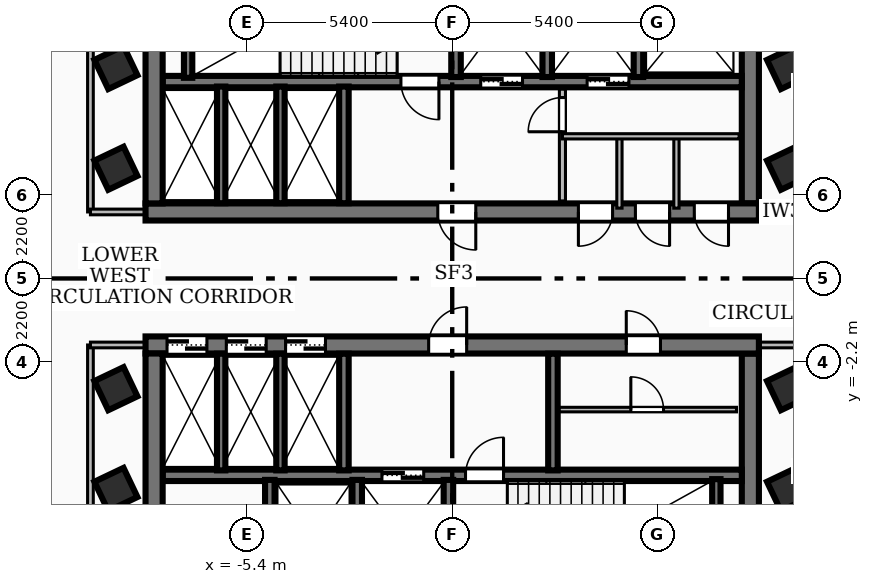
"""IFC4 building model, lengths in metres.
Left out: names, types, materials, properties, quantities, classifications, styles, units other than length and angle.
Written with IfcOpenShell. Run it as: python <this file> out.ifc"""

import sys

from ifc_helpers import new_model, si_unit, direction, frame, frame_2d, origin, origin_2d, place, context, subcontext, project, spatial, rectangle, extrude, element, fill, save


model = new_model("IFC4")
c1 = context("Model", 3, precision=1e-05, world=origin(), true_north=direction((0.0, 1.0)))
c2 = subcontext(c1, "Body", "Model", "MODEL_VIEW")
j1 = project(units=[si_unit("LENGTHUNIT", "METRE"), si_unit("PLANEANGLEUNIT", "RADIAN")], contexts=[c1])
p1 = place(None, origin())
s1 = spatial("IfcSite", under=j1, at=p1, CompositionType="ELEMENT")
p2 = place(p1, origin())
s2 = spatial("IfcBuilding", under=s1, at=p2, CompositionType="ELEMENT")
p3 = place(p2, frame((0.0, 0.0, 188.28)))
s3 = spatial("IfcBuildingStorey", under=s2, at=p3, CompositionType="ELEMENT", Elevation=188.28)
p4 = place(p3, frame((8.07, 1.75, 0.0), z_axis=(0.0, 0.0, 1.0), x_axis=(-1.0, 0.0, 0.0)))
e1 = element("IfcWall", 1, at=p4, inside=s3, PredefinedType="SHEAR", context=c2, shape_type="SweptSolid", body=[
    extrude(rectangle(XDim=16.14, YDim=0.45, at=frame_2d((8.07, 0.0))), origin(), (0.0, 0.0, 1.0), 4.06),
])
p5 = place(p4, frame((7.45, 0.0, 0.0)))
e2 = element("IfcOpeningElement", 2, at=p5, cuts=e1, PredefinedType="OPENING", context=c2, shape_type="SweptSolid", body=[
    extrude(rectangle(XDim=1.0, YDim=2.1, at=frame_2d((0.5, 1.05))), frame((0.0, 0.235, 0.0), z_axis=(0.0, -1.0, 0.0), x_axis=(1.0, 0.0, 0.0)), (0.0, 0.0, 1.0), 0.47),
])
p6 = place(p4, frame((3.85, 0.0, 0.0)))
e3 = element("IfcOpeningElement", 3, at=p6, cuts=e1, PredefinedType="OPENING", context=c2, shape_type="SweptSolid", body=[
    extrude(rectangle(XDim=0.9, YDim=2.06, at=frame_2d((0.45, 1.03))), frame((0.0, 0.235, 0.0), z_axis=(0.0, -1.0, 0.0), x_axis=(1.0, 0.0, 0.0)), (0.0, 0.0, 1.0), 0.47),
])
p7 = place(p4, frame((2.35, 0.0, 0.0)))
e4 = element("IfcOpeningElement", 4, at=p7, cuts=e1, PredefinedType="OPENING", context=c2, shape_type="SweptSolid", body=[
    extrude(rectangle(XDim=0.9, YDim=2.06, at=frame_2d((0.45, 1.03))), frame((0.0, 0.235, 0.0), z_axis=(0.0, -1.0, 0.0), x_axis=(1.0, 0.0, 0.0)), (0.0, 0.0, 1.0), 0.47),
])
p8 = place(p4, frame((0.8, 0.0, 0.0)))
e5 = element("IfcOpeningElement", 5, at=p8, cuts=e1, PredefinedType="OPENING", context=c2, shape_type="SweptSolid", body=[
    extrude(rectangle(XDim=0.9, YDim=2.06, at=frame_2d((0.45, 1.03))), frame((0.0, 0.235, 0.0), z_axis=(0.0, -1.0, 0.0), x_axis=(1.0, 0.0, 0.0)), (0.0, 0.0, 1.0), 0.47),
])
for number, where, z_axis, x_axis in (
    (6, (-7.845, 1.975, 0.0), (0.0, 0.0, 1.0), (0.0, 1.0, 0.0)),
    (7, (7.845, 8.31, 0.0), (0.0, 0.0, 1.0), (0.0, -1.0, 0.0)),
):
    element("IfcWall", number, at=place(p3, frame(where, z_axis=z_axis, x_axis=x_axis)), inside=s3, PredefinedType="SHEAR", context=c2, shape_type="SweptSolid", body=[
        extrude(rectangle(XDim=6.335, YDim=0.45, at=frame_2d((3.167, 0.0))), origin(), (0.0, 0.0, 1.0), 4.06),
    ])
p9 = place(p3, frame((7.62, 5.18, 0.0), z_axis=(0.0, 0.0, 1.0), x_axis=(-1.0, 0.0, 0.0)))
e8 = element("IfcWall", 8, at=p9, inside=s3, PredefinedType="SOLIDWALL", context=c2, shape_type="SweptSolid", body=[
    extrude(rectangle(XDim=15.24, YDim=0.3, at=frame_2d((7.62, 0.0))), origin(), (0.0, 0.0, 1.0), 4.06),
])
p10 = place(p9, frame((5.77, 0.0, 0.0)))
e9 = element("IfcOpeningElement", 9, at=p10, cuts=e8, PredefinedType="OPENING", context=c2, shape_type="SweptSolid", body=[
    extrude(rectangle(XDim=1.1, YDim=2.15, at=frame_2d((0.55, 1.075))), frame((0.0, 0.16, 0.0), z_axis=(0.0, -1.0, 0.0), x_axis=(1.0, 0.0, 0.0)), (0.0, 0.0, 1.0), 0.32),
])
p11 = place(p9, frame((2.97, 0.0, 0.0)))
e10 = element("IfcOpeningElement", 10, at=p11, cuts=e8, PredefinedType="OPENING", context=c2, shape_type="SweptSolid", body=[
    extrude(rectangle(XDim=1.1, YDim=2.15, at=frame_2d((0.55, 1.075))), frame((0.0, 0.16, 0.0), z_axis=(0.0, -1.0, 0.0), x_axis=(1.0, 0.0, 0.0)), (0.0, 0.0, 1.0), 0.32),
])
p12 = place(p9, frame((7.97, 0.0, 0.0)))
e11 = element("IfcOpeningElement", 11, at=p12, cuts=e8, PredefinedType="OPENING", context=c2, shape_type="SweptSolid", body=[
    extrude(rectangle(XDim=1.0, YDim=2.1, at=frame_2d((0.5, 1.05))), frame((0.0, 0.16, 0.0), z_axis=(0.0, -1.0, 0.0), x_axis=(1.0, 0.0, 0.0)), (0.0, 0.0, 1.0), 0.32),
])
p13 = place(p3, frame((-8.07, -1.75, 0.0), z_axis=(0.0, 0.0, 1.0), x_axis=(1.0, 0.0, 0.0)))
e12 = element("IfcWall", 12, at=p13, inside=s3, PredefinedType="SHEAR", context=c2, shape_type="SweptSolid", body=[
    extrude(rectangle(XDim=16.14, YDim=0.45, at=frame_2d((8.07, 0.0))), origin(), (0.0, 0.0, 1.0), 4.06),
])
p14 = place(p13, frame((7.45, 0.0, 0.0)))
e13 = element("IfcOpeningElement", 13, at=p14, cuts=e12, PredefinedType="OPENING", context=c2, shape_type="SweptSolid", body=[
    extrude(rectangle(XDim=1.0, YDim=2.1, at=frame_2d((0.5, 1.05))), frame((0.0, 0.235, 0.0), z_axis=(0.0, -1.0, 0.0), x_axis=(1.0, 0.0, 0.0)), (0.0, 0.0, 1.0), 0.47),
])
p15 = place(p13, frame((12.65, 0.0, 0.0)))
e14 = element("IfcOpeningElement", 14, at=p15, cuts=e12, PredefinedType="OPENING", context=c2, shape_type="SweptSolid", body=[
    extrude(rectangle(XDim=0.9, YDim=2.06, at=frame_2d((0.45, 1.03))), frame((0.0, 0.235, 0.0), z_axis=(0.0, -1.0, 0.0), x_axis=(1.0, 0.0, 0.0)), (0.0, 0.0, 1.0), 0.47),
])
p16 = place(p13, frame((0.565, 0.0, 0.0)))
e15 = element("IfcOpeningElement", 15, at=p16, cuts=e12, PredefinedType="OPENING", context=c2, shape_type="SweptSolid", body=[
    extrude(rectangle(XDim=1.05, YDim=2.15, at=frame_2d((0.525, 1.075))), frame((0.0, 0.235, 0.0), z_axis=(0.0, -1.0, 0.0), x_axis=(1.0, 0.0, 0.0)), (0.0, 0.0, 1.0), 0.47),
])
p17 = place(p13, frame((2.125, 0.0, 0.0)))
e16 = element("IfcOpeningElement", 16, at=p17, cuts=e12, PredefinedType="OPENING", context=c2, shape_type="SweptSolid", body=[
    extrude(rectangle(XDim=1.05, YDim=2.15, at=frame_2d((0.525, 1.075))), frame((0.0, 0.235, 0.0), z_axis=(0.0, -1.0, 0.0), x_axis=(1.0, 0.0, 0.0)), (0.0, 0.0, 1.0), 0.47),
])
p18 = place(p13, frame((3.685, 0.0, 0.0)))
e17 = element("IfcOpeningElement", 17, at=p18, cuts=e12, PredefinedType="OPENING", context=c2, shape_type="SweptSolid", body=[
    extrude(rectangle(XDim=1.05, YDim=2.15, at=frame_2d((0.525, 1.075))), frame((0.0, 0.235, 0.0), z_axis=(0.0, -1.0, 0.0), x_axis=(1.0, 0.0, 0.0)), (0.0, 0.0, 1.0), 0.47),
])
for number, where, z_axis, x_axis in (
    (18, (-7.845, -8.31, 0.0), (0.0, 0.0, 1.0), (0.0, 1.0, 0.0)),
    (19, (7.845, -1.975, 0.0), (0.0, 0.0, 1.0), (0.0, -1.0, 0.0)),
):
    element("IfcWall", number, at=place(p3, frame(where, z_axis=z_axis, x_axis=x_axis)), inside=s3, PredefinedType="SHEAR", context=c2, shape_type="SweptSolid", body=[
        extrude(rectangle(XDim=6.335, YDim=0.45, at=frame_2d((3.167, 0.0))), origin(), (0.0, 0.0, 1.0), 4.06),
    ])
p19 = place(p3, frame((-7.62, -5.18, 0.0), z_axis=(0.0, 0.0, 1.0), x_axis=(1.0, 0.0, 0.0)))
e20 = element("IfcWall", 20, at=p19, inside=s3, PredefinedType="SOLIDWALL", context=c2, shape_type="SweptSolid", body=[
    extrude(rectangle(XDim=15.24, YDim=0.3, at=frame_2d((7.62, 0.0))), origin(), (0.0, 0.0, 1.0), 4.06),
])
p20 = place(p19, frame((5.77, 0.0, 0.0)))
e21 = element("IfcOpeningElement", 21, at=p20, cuts=e20, PredefinedType="OPENING", context=c2, shape_type="SweptSolid", body=[
    extrude(rectangle(XDim=1.1, YDim=2.15, at=frame_2d((0.55, 1.075))), frame((0.0, 0.16, 0.0), z_axis=(0.0, -1.0, 0.0), x_axis=(1.0, 0.0, 0.0)), (0.0, 0.0, 1.0), 0.32),
])
p21 = place(p19, frame((7.97, 0.0, 0.0)))
e22 = element("IfcOpeningElement", 22, at=p21, cuts=e20, PredefinedType="OPENING", context=c2, shape_type="SweptSolid", body=[
    extrude(rectangle(XDim=1.0, YDim=2.1, at=frame_2d((0.5, 1.05))), frame((0.0, 0.16, 0.0), z_axis=(0.0, -1.0, 0.0), x_axis=(1.0, 0.0, 0.0)), (0.0, 0.0, 1.0), 0.32),
])
for number, where, z_axis, x_axis in (
    (23, (-6.95, 5.28, 0.0), (0.0, 0.0, 1.0), (0.0, 1.0, 0.0)),
    (24, (6.95, -8.34, 0.0), (0.0, 0.0, 1.0), (0.0, 1.0, 0.0)),
):
    element("IfcWall", number, at=place(p3, frame(where, z_axis=z_axis, x_axis=x_axis)), inside=s3, PredefinedType="SOLIDWALL", context=c2, shape_type="SweptSolid", body=[
        extrude(rectangle(XDim=3.06, YDim=0.22, at=frame_2d((1.53, 0.0))), origin(), (0.0, 0.0, 1.0), 4.06),
    ])
for number, where, z_axis, x_axis in (
    (25, (0.1, 5.3, 0.0), (0.0, 0.0, 1.0), (0.0, 1.0, 0.0)),
    (26, (2.5, 5.3, 0.0), (0.0, 0.0, 1.0), (0.0, 1.0, 0.0)),
    (27, (4.9, 5.3, 0.0), (0.0, 0.0, 1.0), (0.0, 1.0, 0.0)),
):
    element("IfcWall", number, at=place(p3, frame(where, z_axis=z_axis, x_axis=x_axis)), inside=s3, PredefinedType="SOLIDWALL", context=c2, shape_type="SweptSolid", body=[
        extrude(rectangle(XDim=3.04, YDim=0.25, at=frame_2d((1.52, 0.0))), origin(), (0.0, 0.0, 1.0), 4.06),
    ])
p22 = place(p3, frame((-2.85, 1.98, 0.0), z_axis=(0.0, 0.0, 1.0), x_axis=(0.0, 1.0, 0.0)))
e28 = element("IfcWall", 28, at=p22, inside=s3, PredefinedType="SOLIDWALL", context=c2, shape_type="SweptSolid", body=[
    extrude(rectangle(XDim=3.07, YDim=0.25, at=frame_2d((1.535, 0.0))), origin(), (0.0, 0.0, 1.0), 4.06),
])
for number, where, z_axis, x_axis in (
    (29, (-0.1, -8.34, 0.0), (0.0, 0.0, 1.0), (0.0, 1.0, 0.0)),
    (30, (-2.5, -8.34, 0.0), (0.0, 0.0, 1.0), (0.0, 1.0, 0.0)),
    (31, (-4.8, -8.34, 0.0), (0.0, 0.0, 1.0), (0.0, 1.0, 0.0)),
):
    element("IfcWall", number, at=place(p3, frame(where, z_axis=z_axis, x_axis=x_axis)), inside=s3, PredefinedType="SOLIDWALL", context=c2, shape_type="SweptSolid", body=[
        extrude(rectangle(XDim=3.04, YDim=0.25, at=frame_2d((1.52, 0.0))), origin(), (0.0, 0.0, 1.0), 4.06),
    ])
for number, where, z_axis, x_axis in (
    (32, (-2.85, -5.05, 0.0), (0.0, 0.0, 1.0), (0.0, 1.0, 0.0)),
    (33, (2.65, -5.05, 0.0), (0.0, 0.0, 1.0), (0.0, 1.0, 0.0)),
):
    element("IfcWall", number, at=place(p3, frame(where, z_axis=z_axis, x_axis=x_axis)), inside=s3, PredefinedType="SOLIDWALL", context=c2, shape_type="SweptSolid", body=[
        extrude(rectangle(XDim=3.07, YDim=0.25, at=frame_2d((1.535, 0.0))), origin(), (0.0, 0.0, 1.0), 4.06),
    ])
for number, where, z_axis, x_axis in (
    (34, (-6.08, 1.98, 0.0), (0.0, 0.0, 1.0), (0.0, 1.0, 0.0)),
    (35, (-4.52, 1.98, 0.0), (0.0, 0.0, 1.0), (0.0, 1.0, 0.0)),
    (36, (-6.08, -5.05, 0.0), (0.0, 0.0, 1.0), (0.0, 1.0, 0.0)),
    (37, (-4.52, -5.05, 0.0), (0.0, 0.0, 1.0), (0.0, 1.0, 0.0)),
):
    element("IfcWall", number, at=place(p3, frame(where, z_axis=z_axis, x_axis=x_axis)), inside=s3, PredefinedType="SOLIDWALL", context=c2, shape_type="SweptSolid", body=[
        extrude(rectangle(XDim=3.07, YDim=0.22, at=frame_2d((1.535, 0.0))), origin(), (0.0, 0.0, 1.0), 4.06),
    ])
for number, where, z_axis, x_axis in (
    (38, (-8.85, -5.55, 0.0), (0.0, 0.0, 1.0), (0.903, 0.43, 0.0)),
    (39, (-8.85, -2.9, 0.0), (0.0, 0.0, 1.0), (0.903, 0.43, 0.0)),
    (40, (-8.85, 2.9, 0.0), (0.0, 0.0, 1.0), (0.903, 0.43, 0.0)),
    (41, (-8.85, 5.55, 0.0), (0.0, 0.0, 1.0), (0.903, 0.43, 0.0)),
    (42, (8.85, -5.55, 0.0), (0.0, 0.0, 1.0), (0.903, 0.43, 0.0)),
    (43, (8.85, -2.9, 0.0), (0.0, 0.0, 1.0), (0.903, 0.43, 0.0)),
    (44, (8.85, 2.9, 0.0), (0.0, 0.0, 1.0), (0.903, 0.43, 0.0)),
    (45, (8.85, 5.55, 0.0), (0.0, 0.0, 1.0), (0.903, 0.43, 0.0)),
):
    element("IfcColumn", number, at=place(p3, frame(where, z_axis=z_axis, x_axis=x_axis)), inside=s3, PredefinedType="COLUMN", context=c2, shape_type="SweptSolid", body=[
        extrude(rectangle(XDim=0.85, YDim=0.85, at=origin_2d()), origin(), (0.0, 0.0, 1.0), 4.32),
    ])
p23 = place(p3, frame((2.9, 2.04, 0.0), z_axis=(0.0, 0.0, 1.0), x_axis=(0.0, 1.0, 0.0)))
e46 = element("IfcWall", 46, at=p23, inside=s3, PredefinedType="PARTITIONING", context=c2, shape_type="SweptSolid", body=[
    extrude(rectangle(XDim=2.94, YDim=0.16, at=frame_2d((1.47, 0.0))), origin(), (0.0, 0.0, 1.0), 3.29),
])
p24 = place(p23, frame((1.82, 0.0, 0.0)))
e47 = element("IfcOpeningElement", 47, at=p24, cuts=e46, PredefinedType="OPENING", context=c2, shape_type="SweptSolid", body=[
    extrude(rectangle(XDim=0.9, YDim=2.06, at=frame_2d((0.45, 1.03))), frame((0.0, 0.09, 0.0), z_axis=(0.0, -1.0, 0.0), x_axis=(1.0, 0.0, 0.0)), (0.0, 0.0, 1.0), 0.18),
])
p25 = place(p3, frame((2.9, 3.74, 0.0), z_axis=(0.0, 0.0, 1.0), x_axis=(1.0, 0.0, 0.0)))
e48 = element("IfcWall", 48, at=p25, inside=s3, PredefinedType="PARTITIONING", context=c2, shape_type="SweptSolid", body=[
    extrude(rectangle(XDim=4.65, YDim=0.138, at=frame_2d((2.325, 0.0))), origin(), (0.0, 0.0, 1.0), 4.06),
])
p26 = place(p3, frame((2.8, -3.45, 0.0), z_axis=(0.0, 0.0, 1.0), x_axis=(1.0, 0.0, 0.0)))
e49 = element("IfcWall", 49, at=p26, inside=s3, PredefinedType="PARTITIONING", context=c2, shape_type="SweptSolid", body=[
    extrude(rectangle(XDim=4.68, YDim=0.12, at=frame_2d((2.34, 0.0))), origin(), (0.0, 0.0, 1.0), 4.06),
])
p27 = place(p26, frame((1.9, 0.0, 0.0)))
e50 = element("IfcOpeningElement", 50, at=p27, cuts=e49, PredefinedType="OPENING", context=c2, shape_type="SweptSolid", body=[
    extrude(rectangle(XDim=0.86, YDim=2.04, at=frame_2d((0.43, 1.02))), frame((0.0, 0.07, 0.0), z_axis=(0.0, -1.0, 0.0), x_axis=(1.0, 0.0, 0.0)), (0.0, 0.0, 1.0), 0.14),
])
for number, where, z_axis, x_axis in (
    (51, (4.4, 1.85, 0.0), (0.0, 0.0, 1.0), (0.0, 1.0, 0.0)),
    (52, (5.9, 1.85, 0.0), (0.0, 0.0, 1.0), (0.0, 1.0, 0.0)),
):
    element("IfcWall", number, at=place(p3, frame(where, z_axis=z_axis, x_axis=x_axis)), inside=s3, PredefinedType="PARTITIONING", context=c2, shape_type="SweptSolid", body=[
        extrude(rectangle(XDim=1.89, YDim=0.138, at=frame_2d((0.945, 0.0))), origin(), (0.0, 0.0, 1.0), 3.29),
    ])
p28 = place(p3, frame((-9.52, 1.75, 0.0), z_axis=(0.0, 0.0, 1.0), x_axis=(0.0, 1.0, 0.0)))
e53 = element("IfcWall", 53, at=p28, inside=s3, PredefinedType="PARTITIONING", context=c2, shape_type="SweptSolid", body=[
    extrude(rectangle(XDim=6.63, YDim=0.15, at=frame_2d((3.315, 0.0))), origin(), (0.0, 0.0, 1.0), 4.06),
])
p29 = place(p3, frame((-7.85, 1.75, 0.0), z_axis=(0.0, 0.0, 1.0), x_axis=(-1.0, 0.0, 0.0)))
e54 = element("IfcWall", 54, at=p29, inside=s3, PredefinedType="PARTITIONING", context=c2, shape_type="SweptSolid", body=[
    extrude(rectangle(XDim=1.67, YDim=0.15, at=frame_2d((0.835, 0.0))), origin(), (0.0, 0.0, 1.0), 3.29),
])
p30 = place(p3, frame((-9.52, -8.38, 0.0), z_axis=(0.0, 0.0, 1.0), x_axis=(0.0, 1.0, 0.0)))
e55 = element("IfcWall", 55, at=p30, inside=s3, PredefinedType="PARTITIONING", context=c2, shape_type="SweptSolid", body=[
    extrude(rectangle(XDim=6.63, YDim=0.15, at=frame_2d((3.315, 0.0))), origin(), (0.0, 0.0, 1.0), 3.364),
])
for number, where, z_axis, x_axis in (
    (56, (-7.85, -1.75, 0.0), (0.0, 0.0, 1.0), (-1.0, 0.0, 0.0)),
    (57, (7.85, 1.75, 0.0), (0.0, 0.0, 1.0), (1.0, 0.0, 0.0)),
    (58, (7.85, -1.75, 0.0), (0.0, 0.0, 1.0), (1.0, 0.0, 0.0)),
):
    element("IfcWall", number, at=place(p3, frame(where, z_axis=z_axis, x_axis=x_axis)), inside=s3, PredefinedType="PARTITIONING", context=c2, shape_type="SweptSolid", body=[
        extrude(rectangle(XDim=1.67, YDim=0.15, at=frame_2d((0.835, 0.0))), origin(), (0.0, 0.0, 1.0), 3.29),
    ])
p31 = place(p3, frame((8.362, 15.677, 0.0), z_axis=(0.0, 0.0, 1.0), x_axis=(0.429924831179, -0.902864685064, 0.0)))
e59 = element("IfcWall", 59, at=p31, inside=s3, PredefinedType="PARTITIONING", context=c2, shape_type="SweptSolid", body=[
    extrude(rectangle(XDim=20.58, YDim=0.1, at=frame_2d((10.29, 0.0))), origin(), (0.0, 0.0, 1.0), 3.364),
])
p32 = place(p31, frame((9.96, 0.0, 0.0)))
e60 = element("IfcOpeningElement", 60, at=p32, cuts=e59, PredefinedType="OPENING", context=c2, shape_type="SweptSolid", body=[
    extrude(rectangle(XDim=1.2, YDim=2.1, at=frame_2d((0.6, 1.05))), frame((0.0, 0.06, 0.0), z_axis=(0.0, -1.0, 0.0), x_axis=(1.0, 0.0, 0.0)), (0.0, 0.0, 1.0), 0.12),
])
p33 = place(p3, frame((-8.362, -15.677, 0.0), z_axis=(0.0, 0.0, 1.0), x_axis=(-0.429924831179, 0.902864685064, 0.0)))
e61 = element("IfcWall", 61, at=p33, inside=s3, PredefinedType="PARTITIONING", context=c2, shape_type="SweptSolid", body=[
    extrude(rectangle(XDim=20.58, YDim=0.1, at=frame_2d((10.29, 0.0))), origin(), (0.0, 0.0, 1.0), 3.364),
])
p34 = place(p33, frame((9.96, 0.0, 0.0)))
e62 = element("IfcOpeningElement", 62, at=p34, cuts=e61, PredefinedType="OPENING", context=c2, shape_type="SweptSolid", body=[
    extrude(rectangle(XDim=1.2, YDim=2.1, at=frame_2d((0.6, 1.05))), frame((0.0, 0.06, 0.0), z_axis=(0.0, -1.0, 0.0), x_axis=(1.0, 0.0, 0.0)), (0.0, 0.0, 1.0), 0.12),
])
p35 = place(p5, origin())
e63 = element("IfcDoor", 63, at=p35, inside=s3, OperationType="SINGLE_SWING_LEFT", PredefinedType="DOOR", context=c2, shape_type="SweptSolid", body=[
    extrude(rectangle(XDim=1.0, YDim=2.1, at=frame_2d((0.5, 1.05))), frame((0.0, 0.025, 0.0), z_axis=(0.0, -1.0, 0.0), x_axis=(1.0, 0.0, 0.0)), (0.0, 0.0, 1.0), 0.05),
])
fill(e2, e63)
p36 = place(p14, origin())
e64 = element("IfcDoor", 64, at=p36, inside=s3, OperationType="SINGLE_SWING_RIGHT", PredefinedType="DOOR", context=c2, shape_type="SweptSolid", body=[
    extrude(rectangle(XDim=1.0, YDim=2.1, at=frame_2d((0.5, 1.05))), frame((0.0, 0.025, 0.0), z_axis=(0.0, -1.0, 0.0), x_axis=(1.0, 0.0, 0.0)), (0.0, 0.0, 1.0), 0.05),
])
fill(e13, e64)
p37 = place(p10, origin())
e65 = element("IfcDoor", 65, at=p37, inside=s3, OperationType="DOUBLE_DOOR_SLIDING", PredefinedType="DOOR", context=c2, shape_type="SweptSolid", body=[
    extrude(rectangle(XDim=1.1, YDim=2.15, at=frame_2d((0.55, 1.075))), frame((0.0, 0.025, 0.0), z_axis=(0.0, -1.0, 0.0), x_axis=(1.0, 0.0, 0.0)), (0.0, 0.0, 1.0), 0.05),
])
fill(e9, e65)
p38 = place(p11, origin())
e66 = element("IfcDoor", 66, at=p38, inside=s3, OperationType="DOUBLE_DOOR_SLIDING", PredefinedType="DOOR", context=c2, shape_type="SweptSolid", body=[
    extrude(rectangle(XDim=1.1, YDim=2.15, at=frame_2d((0.55, 1.075))), frame((0.0, 0.025, 0.0), z_axis=(0.0, -1.0, 0.0), x_axis=(1.0, 0.0, 0.0)), (0.0, 0.0, 1.0), 0.05),
])
fill(e10, e66)
p39 = place(p12, origin())
e67 = element("IfcDoor", 67, at=p39, inside=s3, OperationType="SINGLE_SWING_LEFT", PredefinedType="DOOR", context=c2, shape_type="SweptSolid", body=[
    extrude(rectangle(XDim=1.0, YDim=2.1, at=frame_2d((0.5, 1.05))), frame((0.0, 0.025, 0.0), z_axis=(0.0, -1.0, 0.0), x_axis=(1.0, 0.0, 0.0)), (0.0, 0.0, 1.0), 0.05),
])
fill(e11, e67)
p40 = place(p20, origin())
e68 = element("IfcDoor", 68, at=p40, inside=s3, OperationType="DOUBLE_DOOR_SLIDING", PredefinedType="DOOR", context=c2, shape_type="SweptSolid", body=[
    extrude(rectangle(XDim=1.1, YDim=2.15, at=frame_2d((0.55, 1.075))), frame((0.0, 0.025, 0.0), z_axis=(0.0, -1.0, 0.0), x_axis=(1.0, 0.0, 0.0)), (0.0, 0.0, 1.0), 0.05),
])
fill(e21, e68)
p41 = place(p21, origin())
e69 = element("IfcDoor", 69, at=p41, inside=s3, OperationType="SINGLE_SWING_RIGHT", PredefinedType="DOOR", context=c2, shape_type="SweptSolid", body=[
    extrude(rectangle(XDim=1.0, YDim=2.1, at=frame_2d((0.5, 1.05))), frame((0.0, 0.025, 0.0), z_axis=(0.0, -1.0, 0.0), x_axis=(1.0, 0.0, 0.0)), (0.0, 0.0, 1.0), 0.05),
])
fill(e22, e69)
p42 = place(p15, origin())
e70 = element("IfcDoor", 70, at=p42, inside=s3, OperationType="SINGLE_SWING_LEFT", PredefinedType="DOOR", context=c2, shape_type="SweptSolid", body=[
    extrude(rectangle(XDim=0.9, YDim=2.06, at=frame_2d((0.45, 1.03))), frame((0.0, 0.025, 0.0), z_axis=(0.0, -1.0, 0.0), x_axis=(1.0, 0.0, 0.0)), (0.0, 0.0, 1.0), 0.05),
])
fill(e14, e70)
p43 = place(p16, origin())
e71 = element("IfcDoor", 71, at=p43, inside=s3, OperationType="DOUBLE_DOOR_SLIDING", PredefinedType="DOOR", context=c2, shape_type="SweptSolid", body=[
    extrude(rectangle(XDim=1.05, YDim=2.15, at=frame_2d((0.525, 1.075))), frame((0.0, 0.025, 0.0), z_axis=(0.0, -1.0, 0.0), x_axis=(1.0, 0.0, 0.0)), (0.0, 0.0, 1.0), 0.05),
])
fill(e15, e71)
p44 = place(p17, origin())
e72 = element("IfcDoor", 72, at=p44, inside=s3, OperationType="DOUBLE_DOOR_SLIDING", PredefinedType="DOOR", context=c2, shape_type="SweptSolid", body=[
    extrude(rectangle(XDim=1.05, YDim=2.15, at=frame_2d((0.525, 1.075))), frame((0.0, 0.025, 0.0), z_axis=(0.0, -1.0, 0.0), x_axis=(1.0, 0.0, 0.0)), (0.0, 0.0, 1.0), 0.05),
])
fill(e16, e72)
p45 = place(p18, origin())
e73 = element("IfcDoor", 73, at=p45, inside=s3, OperationType="DOUBLE_DOOR_SLIDING", PredefinedType="DOOR", context=c2, shape_type="SweptSolid", body=[
    extrude(rectangle(XDim=1.05, YDim=2.15, at=frame_2d((0.525, 1.075))), frame((0.0, 0.025, 0.0), z_axis=(0.0, -1.0, 0.0), x_axis=(1.0, 0.0, 0.0)), (0.0, 0.0, 1.0), 0.05),
])
fill(e17, e73)
p46 = place(p6, origin())
e74 = element("IfcDoor", 74, at=p46, inside=s3, OperationType="SINGLE_SWING_RIGHT", PredefinedType="DOOR", context=c2, shape_type="SweptSolid", body=[
    extrude(rectangle(XDim=0.9, YDim=2.06, at=frame_2d((0.45, 1.03))), frame((0.0, 0.025, 0.0), z_axis=(0.0, -1.0, 0.0), x_axis=(1.0, 0.0, 0.0)), (0.0, 0.0, 1.0), 0.05),
])
fill(e3, e74)
p47 = place(p7, origin())
e75 = element("IfcDoor", 75, at=p47, inside=s3, OperationType="SINGLE_SWING_LEFT", PredefinedType="DOOR", context=c2, shape_type="SweptSolid", body=[
    extrude(rectangle(XDim=0.9, YDim=2.06, at=frame_2d((0.45, 1.03))), frame((0.0, 0.025, 0.0), z_axis=(0.0, -1.0, 0.0), x_axis=(1.0, 0.0, 0.0)), (0.0, 0.0, 1.0), 0.05),
])
fill(e4, e75)
p48 = place(p8, origin())
e76 = element("IfcDoor", 76, at=p48, inside=s3, OperationType="SINGLE_SWING_LEFT", PredefinedType="DOOR", context=c2, shape_type="SweptSolid", body=[
    extrude(rectangle(XDim=0.9, YDim=2.06, at=frame_2d((0.45, 1.03))), frame((0.0, 0.025, 0.0), z_axis=(0.0, -1.0, 0.0), x_axis=(1.0, 0.0, 0.0)), (0.0, 0.0, 1.0), 0.05),
])
fill(e5, e76)
p49 = place(p24, origin())
e77 = element("IfcDoor", 77, at=p49, inside=s3, OperationType="SINGLE_SWING_LEFT", PredefinedType="DOOR", context=c2, shape_type="SweptSolid", body=[
    extrude(rectangle(XDim=0.9, YDim=2.06, at=frame_2d((0.45, 1.03))), frame((0.0, 0.025, 0.0), z_axis=(0.0, -1.0, 0.0), x_axis=(1.0, 0.0, 0.0)), (0.0, 0.0, 1.0), 0.05),
])
fill(e47, e77)
p50 = place(p27, origin())
e78 = element("IfcDoor", 78, at=p50, inside=s3, OperationType="SINGLE_SWING_LEFT", PredefinedType="DOOR", context=c2, shape_type="SweptSolid", body=[
    extrude(rectangle(XDim=0.86, YDim=2.04, at=frame_2d((0.43, 1.02))), frame((0.0, 0.025, 0.0), z_axis=(0.0, -1.0, 0.0), x_axis=(1.0, 0.0, 0.0)), (0.0, 0.0, 1.0), 0.05),
])
fill(e50, e78)
save(model, sys.argv[1])
